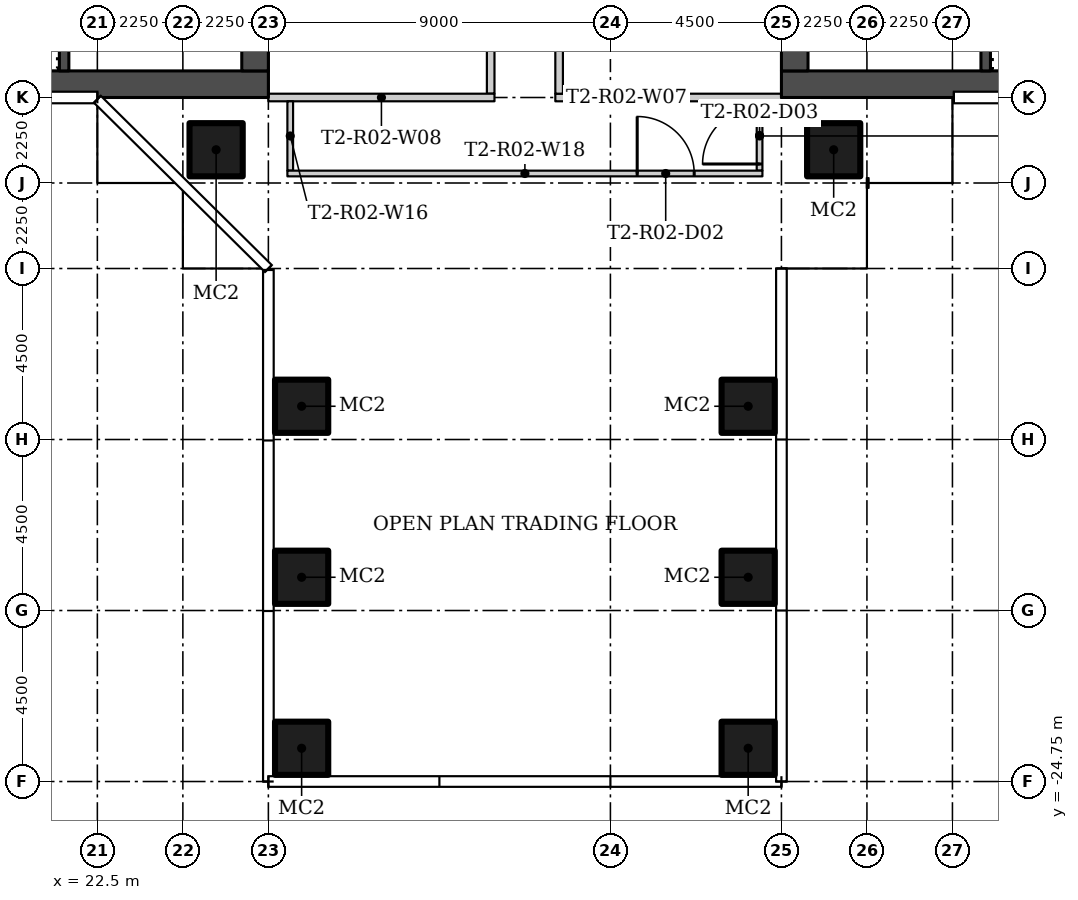
"""IFC4 building model, lengths in metres.
Left out: names, types, materials, properties, quantities, classifications, styles, units other than length and angle.
Written with IfcOpenShell. Run it as: python <this file> out.ifc"""

import sys

from ifc_helpers import new_model, si_unit, direction, frame, frame_2d, origin, origin_2d, place, context, subcontext, project, spatial, rectangle, hollow_rectangle, extrude, element, fill, save


model = new_model("IFC4")
c1 = context("Model", 3, precision=1e-05, world=origin(), true_north=direction((0.0, 1.0)))
c2 = subcontext(c1, "Body", "Model", "MODEL_VIEW")
j1 = project(units=[si_unit("LENGTHUNIT", "METRE"), si_unit("PLANEANGLEUNIT", "RADIAN")], contexts=[c1])
p1 = place(None, origin())
s1 = spatial("IfcSite", under=j1, at=p1, CompositionType="ELEMENT")
p2 = place(p1, origin())
s2 = spatial("IfcBuilding", under=s1, at=p2, CompositionType="ELEMENT")
p3 = place(p2, frame((0.0, 0.0, 33.0)))
s3 = spatial("IfcBuildingStorey", under=s2, at=p3, CompositionType="ELEMENT", Elevation=33.0)
for number, where in (
    (1, (25.625, -8.125, 0.0)),
    (2, (41.875, -8.125, 0.0)),
    (3, (39.625, -14.875, 0.0)),
    (4, (39.625, -19.375, 0.0)),
    (5, (39.625, -23.875, 0.0)),
    (6, (27.875, -14.875, 0.0)),
    (7, (27.875, -19.375, 0.0)),
    (8, (27.875, -23.875, 0.0)),
):
    element("IfcColumn", number, at=place(p3, frame(where)), inside=s3, PredefinedType="COLUMN", context=c2, shape_type="SweptSolid", body=[
        extrude(hollow_rectangle(XDim=1.4, YDim=1.4, WallThickness=0.05, at=origin_2d()), origin(), (0.0, 0.0, 1.0), 4.15),
    ])
p4 = place(p3, frame((32.85, -6.65, 0.0), z_axis=(0.0, 0.0, 1.0), x_axis=(0.0, 1.0, 0.0)))
e9 = element("IfcWall", 9, at=p4, inside=s3, PredefinedType="PARTITIONING", context=c2, shape_type="SweptSolid", body=[
    extrude(rectangle(XDim=6.6, YDim=0.2, at=frame_2d((3.3, 0.0))), origin(), (0.0, 0.0, 1.0), 4.15),
])
p5 = place(p4, frame((2.85, 0.0, 0.0)))
e10 = element("IfcOpeningElement", 10, at=p5, cuts=e9, PredefinedType="OPENING", context=c2, shape_type="SweptSolid", body=[
    extrude(rectangle(XDim=0.9, YDim=2.1, at=frame_2d((0.45, 1.05))), frame((0.0, 0.11, 0.0), z_axis=(0.0, -1.0, 0.0), x_axis=(1.0, 0.0, 0.0)), (0.0, 0.0, 1.0), 0.22),
])
for number, where in (
    (11, (34.55, -6.75, 0.0)),
    (12, (27.0, -6.75, 0.0)),
):
    element("IfcWall", number, at=place(p3, frame(where)), inside=s3, PredefinedType="PARTITIONING", context=c2, shape_type="SweptSolid", body=[
        extrude(rectangle(XDim=5.95, YDim=0.2, at=frame_2d((2.975, 0.0))), origin(), (0.0, 0.0, 1.0), 4.15),
    ])
p6 = place(p3, frame((34.65, -0.05, 0.0), z_axis=(0.0, 0.0, 1.0), x_axis=(0.0, -1.0, 0.0)))
e13 = element("IfcWall", 13, at=p6, inside=s3, PredefinedType="PARTITIONING", context=c2, shape_type="SweptSolid", body=[
    extrude(rectangle(XDim=6.6, YDim=0.2, at=frame_2d((3.3, 0.0))), origin(), (0.0, 0.0, 1.0), 4.15),
])
p7 = place(p6, frame((2.85, 0.0, 0.0)))
e14 = element("IfcOpeningElement", 14, at=p7, cuts=e13, PredefinedType="OPENING", context=c2, shape_type="SweptSolid", body=[
    extrude(rectangle(XDim=0.9, YDim=2.1, at=frame_2d((0.45, 1.05))), frame((0.0, 0.11, 0.0), z_axis=(0.0, -1.0, 0.0), x_axis=(1.0, 0.0, 0.0)), (0.0, 0.0, 1.0), 0.22),
])
p8 = place(p3, frame((39.925, -8.675, 0.0), z_axis=(0.0, 0.0, 1.0), x_axis=(0.0, 1.0, 0.0)))
e15 = element("IfcWall", 15, at=p8, inside=s3, PredefinedType="PARTITIONING", context=c2, shape_type="SweptSolid", body=[
    extrude(rectangle(XDim=1.825, YDim=0.15, at=frame_2d((0.913, 0.0))), origin(), (0.0, 0.0, 1.0), 4.15),
])
p9 = place(p8, frame((0.175, 0.0, 0.0)))
e16 = element("IfcOpeningElement", 16, at=p9, cuts=e15, PredefinedType="OPENING", context=c2, shape_type="SweptSolid", body=[
    extrude(rectangle(XDim=1.5, YDim=2.4, at=frame_2d((0.75, 1.2))), frame((0.0, 0.085, 0.0), z_axis=(0.0, -1.0, 0.0), x_axis=(1.0, 0.0, 0.0)), (0.0, 0.0, 1.0), 0.17),
])
p10 = place(p3, frame((27.575, -6.85, 0.0), z_axis=(0.0, 0.0, 1.0), x_axis=(0.0, -1.0, 0.0)))
e17 = element("IfcWall", 17, at=p10, inside=s3, PredefinedType="PARTITIONING", context=c2, shape_type="SweptSolid", body=[
    extrude(rectangle(XDim=1.825, YDim=0.15, at=frame_2d((0.913, 0.0))), origin(), (0.0, 0.0, 1.0), 4.15),
])
p11 = place(p3, frame((27.5, -8.75, 0.0)))
e18 = element("IfcWall", 18, at=p11, inside=s3, PredefinedType="PARTITIONING", context=c2, shape_type="SweptSolid", body=[
    extrude(rectangle(XDim=12.5, YDim=0.15, at=frame_2d((6.25, 0.0))), origin(), (0.0, 0.0, 1.0), 4.15),
])
p12 = place(p11, frame((9.205, 0.0, 0.0)))
e19 = element("IfcOpeningElement", 19, at=p12, cuts=e18, PredefinedType="OPENING", context=c2, shape_type="SweptSolid", body=[
    extrude(rectangle(XDim=1.5, YDim=2.4, at=frame_2d((0.75, 1.2))), frame((0.0, 0.085, 0.0), z_axis=(0.0, -1.0, 0.0), x_axis=(1.0, 0.0, 0.0)), (0.0, 0.0, 1.0), 0.17),
])
p13 = place(p3, frame((13.5, -6.4, 0.0)))
e20 = element("IfcWall", 20, at=p13, inside=s3, PredefinedType="SHEAR", context=c2, shape_type="SweptSolid", body=[
    extrude(rectangle(XDim=13.5, YDim=0.7, at=frame_2d((6.75, 0.0))), origin(), (0.0, 0.0, 1.0), 4.15),
])
p14 = place(p3, frame((26.65, 6.05, 0.0), z_axis=(0.0, 0.0, 1.0), x_axis=(0.0, -1.0, 0.0)))
e21 = element("IfcWall", 21, at=p14, inside=s3, PredefinedType="SHEAR", context=c2, shape_type="SweptSolid", body=[
    extrude(rectangle(XDim=12.1, YDim=0.7, at=frame_2d((6.05, 0.0))), origin(), (0.0, 0.0, 1.0), 4.15),
])
p15 = place(p14, frame((10.1, 0.0, 0.0)))
e22 = element("IfcOpeningElement", 22, at=p15, cuts=e21, PredefinedType="OPENING", context=c2, shape_type="SweptSolid", body=[
    extrude(rectangle(XDim=1.2, YDim=2.1, at=frame_2d((0.6, 1.05))), frame((0.0, 0.36, 0.0), z_axis=(0.0, -1.0, 0.0), x_axis=(1.0, 0.0, 0.0)), (0.0, 0.0, 1.0), 0.72),
])
p16 = place(p14, frame((3.9, 0.0, 0.0)))
e23 = element("IfcOpeningElement", 23, at=p16, cuts=e21, PredefinedType="OPENING", context=c2, shape_type="SweptSolid", body=[
    extrude(rectangle(XDim=1.8, YDim=2.4, at=frame_2d((0.9, 1.2))), frame((0.0, 0.36, 0.0), z_axis=(0.0, -1.0, 0.0), x_axis=(1.0, 0.0, 0.0)), (0.0, 0.0, 1.0), 0.72),
])
p17 = place(p3, frame((21.625, -6.05, 0.0), z_axis=(0.0, 0.0, 1.0), x_axis=(0.0, 1.0, 0.0)))
e24 = element("IfcWall", 24, at=p17, inside=s3, PredefinedType="SHEAR", context=c2, shape_type="SweptSolid", body=[
    extrude(rectangle(XDim=2.55, YDim=0.25, at=frame_2d((1.275, 0.0))), origin(), (0.0, 0.0, 1.0), 4.15),
])
p18 = place(p3, frame((54.0, -6.4, 0.0), z_axis=(0.0, 0.0, 1.0), x_axis=(-1.0, 0.0, 0.0)))
e25 = element("IfcWall", 25, at=p18, inside=s3, PredefinedType="SHEAR", context=c2, shape_type="SweptSolid", body=[
    extrude(rectangle(XDim=13.5, YDim=0.7, at=frame_2d((6.75, 0.0))), origin(), (0.0, 0.0, 1.0), 4.15),
])
p19 = place(p3, frame((40.85, -6.05, 0.0), z_axis=(0.0, 0.0, 1.0), x_axis=(0.0, 1.0, 0.0)))
e26 = element("IfcWall", 26, at=p19, inside=s3, PredefinedType="SHEAR", context=c2, shape_type="SweptSolid", body=[
    extrude(rectangle(XDim=12.1, YDim=0.7, at=frame_2d((6.05, 0.0))), origin(), (0.0, 0.0, 1.0), 4.15),
])
p20 = place(p19, frame((0.8, 0.0, 0.0)))
e27 = element("IfcOpeningElement", 27, at=p20, cuts=e26, PredefinedType="OPENING", context=c2, shape_type="SweptSolid", body=[
    extrude(rectangle(XDim=1.2, YDim=2.1, at=frame_2d((0.6, 1.05))), frame((0.0, 0.36, 0.0), z_axis=(0.0, -1.0, 0.0), x_axis=(1.0, 0.0, 0.0)), (0.0, 0.0, 1.0), 0.72),
])
p21 = place(p19, frame((6.4, 0.0, 0.0)))
e28 = element("IfcOpeningElement", 28, at=p21, cuts=e26, PredefinedType="OPENING", context=c2, shape_type="SweptSolid", body=[
    extrude(rectangle(XDim=1.8, YDim=2.4, at=frame_2d((0.9, 1.2))), frame((0.0, 0.36, 0.0), z_axis=(0.0, -1.0, 0.0), x_axis=(1.0, 0.0, 0.0)), (0.0, 0.0, 1.0), 0.72),
])
p22 = place(p3, frame((45.875, -6.05, 0.0), z_axis=(0.0, 0.0, 1.0), x_axis=(0.0, 1.0, 0.0)))
e29 = element("IfcWall", 29, at=p22, inside=s3, PredefinedType="SHEAR", context=c2, shape_type="SweptSolid", body=[
    extrude(rectangle(XDim=2.55, YDim=0.25, at=frame_2d((1.275, 0.0))), origin(), (0.0, 0.0, 1.0), 4.15),
])
p23 = place(p12, origin())
e30 = element("IfcDoor", 30, at=p23, inside=s3, OperationType="DOUBLE_DOOR_SINGLE_SWING", PredefinedType="DOOR", context=c2, shape_type="SweptSolid", body=[
    extrude(rectangle(XDim=1.5, YDim=2.4, at=frame_2d((0.75, 1.2))), frame((0.0, 0.025, 0.0), z_axis=(0.0, -1.0, 0.0), x_axis=(1.0, 0.0, 0.0)), (0.0, 0.0, 1.0), 0.05),
])
fill(e19, e30)
p24 = place(p9, origin())
e31 = element("IfcDoor", 31, at=p24, inside=s3, OperationType="DOUBLE_DOOR_SINGLE_SWING", PredefinedType="DOOR", context=c2, shape_type="SweptSolid", body=[
    extrude(rectangle(XDim=1.5, YDim=2.4, at=frame_2d((0.75, 1.2))), frame((0.0, 0.025, 0.0), z_axis=(0.0, -1.0, 0.0), x_axis=(1.0, 0.0, 0.0)), (0.0, 0.0, 1.0), 0.05),
])
fill(e16, e31)
save(model, sys.argv[1])
